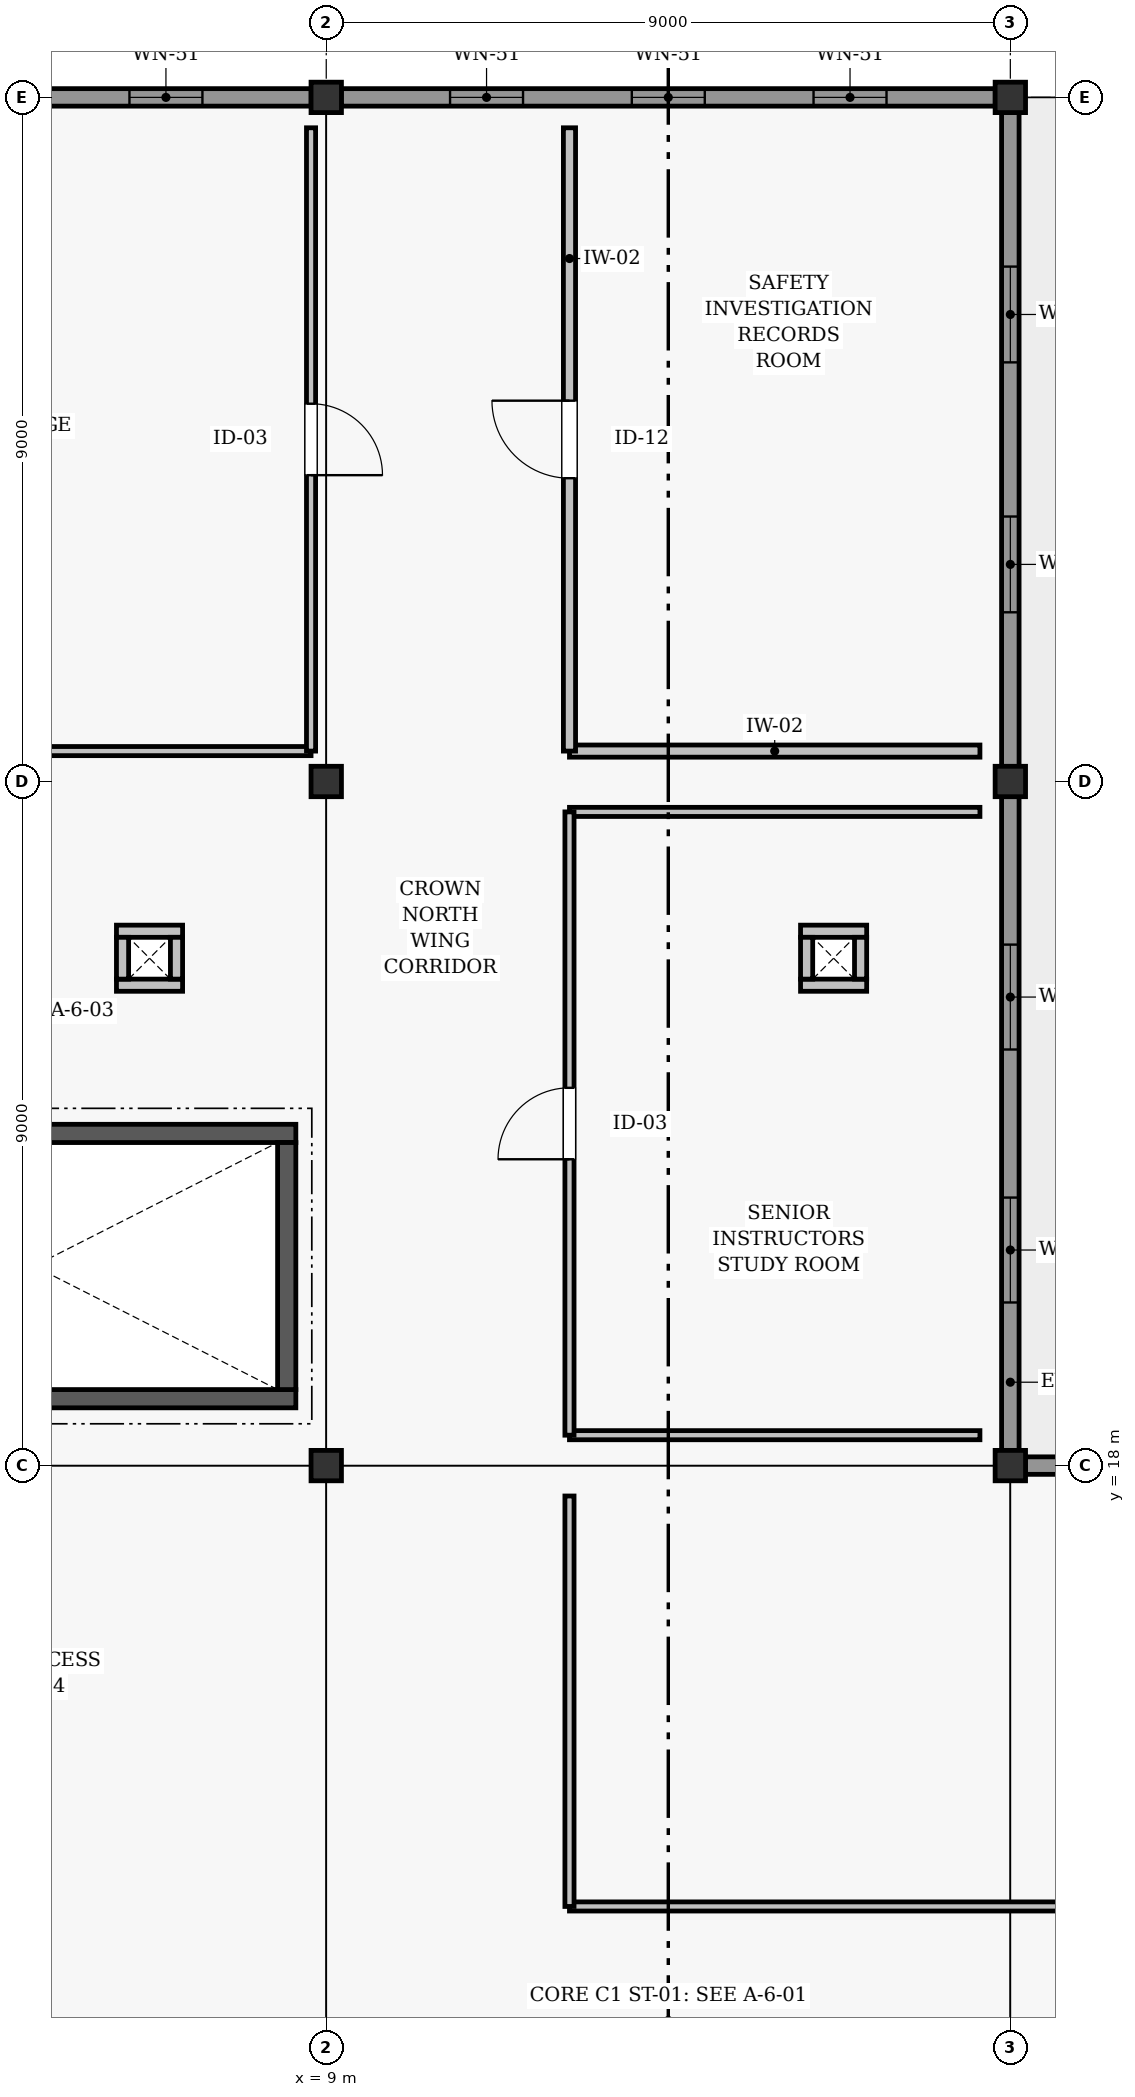
"""IFC4 building model, lengths in metres.
Left out: names, types, materials, properties, quantities, classifications, styles, units other than length and angle.
Written with IfcOpenShell. Run it as: python <this file> out.ifc"""

import sys

from ifc_helpers import new_model, si_unit, direction, frame, frame_2d, origin, origin_2d, place, context, subcontext, project, spatial, rectangle, extrude, element, fill, save


model = new_model("IFC4")
c1 = context("Model", 3, precision=1e-05, world=origin(), true_north=direction((0.0, 1.0)))
c2 = subcontext(c1, "Body", "Model", "MODEL_VIEW")
j1 = project(units=[si_unit("LENGTHUNIT", "METRE"), si_unit("PLANEANGLEUNIT", "RADIAN")], contexts=[c1])
p1 = place(None, origin())
s1 = spatial("IfcSite", under=j1, at=p1, CompositionType="ELEMENT")
p2 = place(p1, origin())
s2 = spatial("IfcBuilding", under=s1, at=p2, CompositionType="ELEMENT")
p3 = place(p2, frame((0.0, 0.0, 15.0)))
s3 = spatial("IfcBuildingStorey", under=s2, at=p3, CompositionType="ELEMENT", Elevation=15.0)
for number, where, z_axis, x_axis in (
    (1, (9.0, 18.0, 0.0), (0.0, 0.0, 1.0), (1.0, 0.0, 0.0)),
    (2, (9.0, 27.0, 0.0), (0.0, 0.0, 1.0), (1.0, 0.0, 0.0)),
    (3, (9.0, 36.0, 0.0), (0.0, 0.0, 1.0), (1.0, 0.0, 0.0)),
    (4, (18.0, 18.0, 0.0), (0.0, 0.0, 1.0), (1.0, 0.0, 0.0)),
    (5, (18.0, 27.0, 0.0), (0.0, 0.0, 1.0), (1.0, 0.0, 0.0)),
    (6, (18.0, 36.0, 0.0), (0.0, 0.0, 1.0), (1.0, 0.0, 0.0)),
):
    element("IfcColumn", number, at=place(p3, frame(where, z_axis=z_axis, x_axis=x_axis)), inside=s3, PredefinedType="COLUMN", context=c2, shape_type="SweptSolid", body=[
        extrude(rectangle(XDim=0.4, YDim=0.4, at=origin_2d()), origin(), (0.0, 0.0, 1.0), 3.0),
    ])
p4 = place(p3, frame((18.198, 18.0, 0.0), z_axis=(0.0, 0.0, 1.0), x_axis=(1.0, 0.0, 0.0)))
e7 = element("IfcWall", 7, at=p4, inside=s3, PredefinedType="SOLIDWALL", context=c2, shape_type="SweptSolid", body=[
    extrude(rectangle(XDim=8.604, YDim=0.23, at=frame_2d((4.302, 0.0))), origin(), (0.0, 0.0, 1.0), 2.242),
])
p5 = place(p4, frame((1.551, 0.0, 1.16)))
e8 = element("IfcOpeningElement", 8, at=p5, cuts=e7, PredefinedType="OPENING", context=c2, shape_type="SweptSolid", body=[
    extrude(rectangle(XDim=0.8, YDim=0.9, at=frame_2d((0.4, 0.45))), frame((0.0, 0.125, 0.0), z_axis=(0.0, -1.0, 0.0), x_axis=(1.0, 0.0, 0.0)), (0.0, 0.0, 1.0), 0.25),
])
p6 = place(p4, frame((3.902, 0.0, 1.16)))
e9 = element("IfcOpeningElement", 9, at=p6, cuts=e7, PredefinedType="OPENING", context=c2, shape_type="SweptSolid", body=[
    extrude(rectangle(XDim=0.8, YDim=0.9, at=frame_2d((0.4, 0.45))), frame((0.0, 0.125, 0.0), z_axis=(0.0, -1.0, 0.0), x_axis=(1.0, 0.0, 0.0)), (0.0, 0.0, 1.0), 0.25),
])
p7 = place(p4, frame((6.253, 0.0, 1.16)))
e10 = element("IfcOpeningElement", 10, at=p7, cuts=e7, PredefinedType="OPENING", context=c2, shape_type="SweptSolid", body=[
    extrude(rectangle(XDim=0.8, YDim=0.9, at=frame_2d((0.4, 0.45))), frame((0.0, 0.125, 0.0), z_axis=(0.0, -1.0, 0.0), x_axis=(1.0, 0.0, 0.0)), (0.0, 0.0, 1.0), 0.25),
])
p8 = place(p3, frame((0.198, 36.0, 0.0), z_axis=(0.0, 0.0, 1.0), x_axis=(1.0, 0.0, 0.0)))
e11 = element("IfcWall", 11, at=p8, inside=s3, PredefinedType="SOLIDWALL", context=c2, shape_type="SweptSolid", body=[
    extrude(rectangle(XDim=8.604, YDim=0.23, at=frame_2d((4.302, 0.0))), origin(), (0.0, 0.0, 1.0), 2.292),
])
p9 = place(p8, frame((1.431, 0.0, 0.8)))
e12 = element("IfcOpeningElement", 12, at=p9, cuts=e11, PredefinedType="OPENING", context=c2, shape_type="SweptSolid", body=[
    extrude(rectangle(XDim=0.96, YDim=1.04, at=frame_2d((0.48, 0.52))), frame((0.0, 0.125, 0.0), z_axis=(0.0, -1.0, 0.0), x_axis=(1.0, 0.0, 0.0)), (0.0, 0.0, 1.0), 0.25),
])
p10 = place(p8, frame((3.822, 0.0, 0.8)))
e13 = element("IfcOpeningElement", 13, at=p10, cuts=e11, PredefinedType="OPENING", context=c2, shape_type="SweptSolid", body=[
    extrude(rectangle(XDim=0.96, YDim=1.04, at=frame_2d((0.48, 0.52))), frame((0.0, 0.125, 0.0), z_axis=(0.0, -1.0, 0.0), x_axis=(1.0, 0.0, 0.0)), (0.0, 0.0, 1.0), 0.25),
])
p11 = place(p8, frame((6.213, 0.0, 0.8)))
e14 = element("IfcOpeningElement", 14, at=p11, cuts=e11, PredefinedType="OPENING", context=c2, shape_type="SweptSolid", body=[
    extrude(rectangle(XDim=0.96, YDim=1.04, at=frame_2d((0.48, 0.52))), frame((0.0, 0.125, 0.0), z_axis=(0.0, -1.0, 0.0), x_axis=(1.0, 0.0, 0.0)), (0.0, 0.0, 1.0), 0.25),
])
p12 = place(p3, frame((9.198, 36.0, 0.0), z_axis=(0.0, 0.0, 1.0), x_axis=(1.0, 0.0, 0.0)))
e15 = element("IfcWall", 15, at=p12, inside=s3, PredefinedType="SOLIDWALL", context=c2, shape_type="SweptSolid", body=[
    extrude(rectangle(XDim=8.604, YDim=0.23, at=frame_2d((4.302, 0.0))), origin(), (0.0, 0.0, 1.0), 2.292),
])
p13 = place(p12, frame((1.431, 0.0, 0.8)))
e16 = element("IfcOpeningElement", 16, at=p13, cuts=e15, PredefinedType="OPENING", context=c2, shape_type="SweptSolid", body=[
    extrude(rectangle(XDim=0.96, YDim=1.04, at=frame_2d((0.48, 0.52))), frame((0.0, 0.125, 0.0), z_axis=(0.0, -1.0, 0.0), x_axis=(1.0, 0.0, 0.0)), (0.0, 0.0, 1.0), 0.25),
])
p14 = place(p12, frame((3.822, 0.0, 0.8)))
e17 = element("IfcOpeningElement", 17, at=p14, cuts=e15, PredefinedType="OPENING", context=c2, shape_type="SweptSolid", body=[
    extrude(rectangle(XDim=0.96, YDim=1.04, at=frame_2d((0.48, 0.52))), frame((0.0, 0.125, 0.0), z_axis=(0.0, -1.0, 0.0), x_axis=(1.0, 0.0, 0.0)), (0.0, 0.0, 1.0), 0.25),
])
p15 = place(p12, frame((6.213, 0.0, 0.8)))
e18 = element("IfcOpeningElement", 18, at=p15, cuts=e15, PredefinedType="OPENING", context=c2, shape_type="SweptSolid", body=[
    extrude(rectangle(XDim=0.96, YDim=1.04, at=frame_2d((0.48, 0.52))), frame((0.0, 0.125, 0.0), z_axis=(0.0, -1.0, 0.0), x_axis=(1.0, 0.0, 0.0)), (0.0, 0.0, 1.0), 0.25),
])
p16 = place(p3, frame((18.0, 18.198, 0.0), z_axis=(0.0, 0.0, 1.0), x_axis=(0.0, 1.0, 0.0)))
e19 = element("IfcWall", 19, at=p16, inside=s3, PredefinedType="SOLIDWALL", context=c2, shape_type="SweptSolid", body=[
    extrude(rectangle(XDim=8.604, YDim=0.23, at=frame_2d((4.302, 0.0))), origin(), (0.0, 0.0, 1.0), 2.242),
])
p17 = place(p16, frame((1.948, 0.0, 0.54)))
e20 = element("IfcOpeningElement", 20, at=p17, cuts=e19, PredefinedType="OPENING", context=c2, shape_type="SweptSolid", body=[
    extrude(rectangle(XDim=1.38, YDim=1.52, at=frame_2d((0.69, 0.76))), frame((0.0, 0.125, 0.0), z_axis=(0.0, -1.0, 0.0), x_axis=(1.0, 0.0, 0.0)), (0.0, 0.0, 1.0), 0.25),
])
p18 = place(p16, frame((5.276, 0.0, 0.54)))
e21 = element("IfcOpeningElement", 21, at=p18, cuts=e19, PredefinedType="OPENING", context=c2, shape_type="SweptSolid", body=[
    extrude(rectangle(XDim=1.38, YDim=1.52, at=frame_2d((0.69, 0.76))), frame((0.0, 0.125, 0.0), z_axis=(0.0, -1.0, 0.0), x_axis=(1.0, 0.0, 0.0)), (0.0, 0.0, 1.0), 0.25),
])
p19 = place(p3, frame((18.0, 27.198, 0.0), z_axis=(0.0, 0.0, 1.0), x_axis=(0.0, 1.0, 0.0)))
e22 = element("IfcWall", 22, at=p19, inside=s3, PredefinedType="SOLIDWALL", context=c2, shape_type="SweptSolid", body=[
    extrude(rectangle(XDim=8.604, YDim=0.23, at=frame_2d((4.302, 0.0))), origin(), (0.0, 0.0, 1.0), 2.292),
])
p20 = place(p19, frame((2.028, 0.0, 0.65)))
e23 = element("IfcOpeningElement", 23, at=p20, cuts=e22, PredefinedType="OPENING", context=c2, shape_type="SweptSolid", body=[
    extrude(rectangle(XDim=1.26, YDim=1.46, at=frame_2d((0.63, 0.73))), frame((0.0, 0.125, 0.0), z_axis=(0.0, -1.0, 0.0), x_axis=(1.0, 0.0, 0.0)), (0.0, 0.0, 1.0), 0.25),
])
p21 = place(p19, frame((5.316, 0.0, 0.65)))
e24 = element("IfcOpeningElement", 24, at=p21, cuts=e22, PredefinedType="OPENING", context=c2, shape_type="SweptSolid", body=[
    extrude(rectangle(XDim=1.26, YDim=1.46, at=frame_2d((0.63, 0.73))), frame((0.0, 0.125, 0.0), z_axis=(0.0, -1.0, 0.0), x_axis=(1.0, 0.0, 0.0)), (0.0, 0.0, 1.0), 0.25),
])
p22 = place(p3, frame((0.16, 18.88, 0.0), z_axis=(0.0, 0.0, 1.0), x_axis=(1.0, 0.0, 0.0)))
e25 = element("IfcWall", 25, at=p22, inside=s3, PredefinedType="SHEAR", context=c2, shape_type="SweptSolid", body=[
    extrude(rectangle(XDim=8.44, YDim=0.24, at=frame_2d((4.22, 0.0))), origin(), (0.0, 0.0, 1.0), 2.79),
])
p23 = place(p22, frame((0.48, 0.0, 0.0)))
e26 = element("IfcOpeningElement", 26, at=p23, cuts=e25, PredefinedType="OPENING", context=c2, shape_type="SweptSolid", body=[
    extrude(rectangle(XDim=1.08, YDim=2.08, at=frame_2d((0.54, 1.04))), frame((0.0, 0.13, 0.0), z_axis=(0.0, -1.0, 0.0), x_axis=(1.0, 0.0, 0.0)), (0.0, 0.0, 1.0), 0.26),
])
p24 = place(p3, frame((0.16, 22.37, 0.0), z_axis=(0.0, 0.0, 1.0), x_axis=(1.0, 0.0, 0.0)))
e27 = element("IfcWall", 27, at=p24, inside=s3, PredefinedType="SHEAR", context=c2, shape_type="SweptSolid", body=[
    extrude(rectangle(XDim=8.44, YDim=0.24, at=frame_2d((4.22, 0.0))), origin(), (0.0, 0.0, 1.0), 2.79),
])
p25 = place(p3, frame((8.48, 19.0, 0.0), z_axis=(0.0, 0.0, 1.0), x_axis=(0.0, 1.0, 0.0)))
e28 = element("IfcWall", 28, at=p25, inside=s3, PredefinedType="SHEAR", context=c2, shape_type="SweptSolid", body=[
    extrude(rectangle(XDim=3.25, YDim=0.24, at=frame_2d((1.625, 0.0))), origin(), (0.0, 0.0, 1.0), 2.79),
])
for number, where, z_axis, x_axis in (
    (29, (6.24, 24.32, 0.0), (0.0, 0.0, 1.0), (1.0, 0.0, 0.0)),
    (30, (6.24, 25.03, 0.0), (0.0, 0.0, 1.0), (1.0, 0.0, 0.0)),
):
    element("IfcWall", number, at=place(p3, frame(where, z_axis=z_axis, x_axis=x_axis)), inside=s3, PredefinedType="PARTITIONING", context=c2, shape_type="SweptSolid", body=[
        extrude(rectangle(XDim=0.87, YDim=0.16, at=frame_2d((0.435, 0.0))), origin(), (0.0, 0.0, 1.0), 2.79),
    ])
for number, where, z_axis, x_axis in (
    (31, (6.32, 24.4, 0.0), (0.0, 0.0, 1.0), (0.0, 1.0, 0.0)),
    (32, (7.03, 24.4, 0.0), (0.0, 0.0, 1.0), (0.0, 1.0, 0.0)),
):
    element("IfcWall", number, at=place(p3, frame(where, z_axis=z_axis, x_axis=x_axis)), inside=s3, PredefinedType="PARTITIONING", context=c2, shape_type="SweptSolid", body=[
        extrude(rectangle(XDim=0.55, YDim=0.16, at=frame_2d((0.275, 0.0))), origin(), (0.0, 0.0, 1.0), 2.79),
    ])
for number, where, z_axis, x_axis in (
    (33, (15.24, 24.32, 0.0), (0.0, 0.0, 1.0), (1.0, 0.0, 0.0)),
    (34, (15.24, 25.03, 0.0), (0.0, 0.0, 1.0), (1.0, 0.0, 0.0)),
):
    element("IfcWall", number, at=place(p3, frame(where, z_axis=z_axis, x_axis=x_axis)), inside=s3, PredefinedType="PARTITIONING", context=c2, shape_type="SweptSolid", body=[
        extrude(rectangle(XDim=0.87, YDim=0.16, at=frame_2d((0.435, 0.0))), origin(), (0.0, 0.0, 1.0), 2.79),
    ])
for number, where, z_axis, x_axis in (
    (35, (15.32, 24.4, 0.0), (0.0, 0.0, 1.0), (0.0, 1.0, 0.0)),
    (36, (16.03, 24.4, 0.0), (0.0, 0.0, 1.0), (0.0, 1.0, 0.0)),
):
    element("IfcWall", number, at=place(p3, frame(where, z_axis=z_axis, x_axis=x_axis)), inside=s3, PredefinedType="PARTITIONING", context=c2, shape_type="SweptSolid", body=[
        extrude(rectangle(XDim=0.55, YDim=0.16, at=frame_2d((0.275, 0.0))), origin(), (0.0, 0.0, 1.0), 2.79),
    ])
p26 = place(p3, frame((12.2, 12.2, 0.0), z_axis=(0.0, 0.0, 1.0), x_axis=(1.0, 0.0, 0.0)))
e37 = element("IfcWall", 37, at=p26, inside=s3, PredefinedType="PARTITIONING", context=c2, shape_type="SweptSolid", body=[
    extrude(rectangle(XDim=23.4, YDim=0.12, at=frame_2d((11.7, 0.0))), origin(), (0.0, 0.0, 1.0), 2.245),
])
p27 = place(p26, frame((9.49, 0.0, 0.0)))
e38 = element("IfcOpeningElement", 38, at=p27, cuts=e37, PredefinedType="OPENING", context=c2, shape_type="SweptSolid", body=[
    extrude(rectangle(XDim=1.62, YDim=2.14, at=frame_2d((0.81, 1.07))), frame((0.0, 0.07, 0.0), z_axis=(0.0, -1.0, 0.0), x_axis=(1.0, 0.0, 0.0)), (0.0, 0.0, 1.0), 0.14),
])
for number, where, z_axis, x_axis in (
    (39, (12.2, 12.2, 0.0), (0.0, 0.0, 1.0), (0.0, 1.0, 0.0)),
    (40, (12.2, 18.4, 0.0), (0.0, 0.0, 1.0), (1.0, 0.0, 0.0)),
    (41, (12.2, 26.6, 0.0), (0.0, 0.0, 1.0), (1.0, 0.0, 0.0)),
):
    element("IfcWall", number, at=place(p3, frame(where, z_axis=z_axis, x_axis=x_axis)), inside=s3, PredefinedType="PARTITIONING", context=c2, shape_type="SweptSolid", body=[
        extrude(rectangle(XDim=5.4, YDim=0.12, at=frame_2d((2.7, 0.0))), origin(), (0.0, 0.0, 1.0), 2.79),
    ])
p28 = place(p3, frame((12.2, 18.4, 0.0), z_axis=(0.0, 0.0, 1.0), x_axis=(0.0, 1.0, 0.0)))
e42 = element("IfcWall", 42, at=p28, inside=s3, PredefinedType="PARTITIONING", context=c2, shape_type="SweptSolid", body=[
    extrude(rectangle(XDim=8.2, YDim=0.12, at=frame_2d((4.1, 0.0))), origin(), (0.0, 0.0, 1.0), 2.79),
])
p29 = place(p28, frame((3.63, 0.0, 0.0)))
e43 = element("IfcOpeningElement", 43, at=p29, cuts=e42, PredefinedType="OPENING", context=c2, shape_type="SweptSolid", body=[
    extrude(rectangle(XDim=0.94, YDim=2.06, at=frame_2d((0.47, 1.03))), frame((0.0, 0.07, 0.0), z_axis=(0.0, -1.0, 0.0), x_axis=(1.0, 0.0, 0.0)), (0.0, 0.0, 1.0), 0.14),
])
p30 = place(p3, frame((12.2, 27.4, 0.0), z_axis=(0.0, 0.0, 1.0), x_axis=(1.0, 0.0, 0.0)))
e44 = element("IfcWall", 44, at=p30, inside=s3, PredefinedType="PARTITIONING", context=c2, shape_type="SweptSolid", body=[
    extrude(rectangle(XDim=5.4, YDim=0.16, at=frame_2d((2.7, 0.0))), origin(), (0.0, 0.0, 1.0), 2.79),
])
p31 = place(p3, frame((12.2, 27.4, 0.0), z_axis=(0.0, 0.0, 1.0), x_axis=(0.0, 1.0, 0.0)))
e45 = element("IfcWall", 45, at=p31, inside=s3, PredefinedType="PARTITIONING", context=c2, shape_type="SweptSolid", body=[
    extrude(rectangle(XDim=8.2, YDim=0.16, at=frame_2d((4.1, 0.0))), origin(), (0.0, 0.0, 1.0), 2.79),
])
p32 = place(p31, frame((3.59, 0.0, 0.0)))
e46 = element("IfcOpeningElement", 46, at=p32, cuts=e45, PredefinedType="OPENING", context=c2, shape_type="SweptSolid", body=[
    extrude(rectangle(XDim=1.02, YDim=2.1, at=frame_2d((0.51, 1.05))), frame((0.0, 0.09, 0.0), z_axis=(0.0, -1.0, 0.0), x_axis=(1.0, 0.0, 0.0)), (0.0, 0.0, 1.0), 0.18),
])
p33 = place(p3, frame((0.4, 27.4, 0.0), z_axis=(0.0, 0.0, 1.0), x_axis=(1.0, 0.0, 0.0)))
e47 = element("IfcWall", 47, at=p33, inside=s3, PredefinedType="PARTITIONING", context=c2, shape_type="SweptSolid", body=[
    extrude(rectangle(XDim=8.4, YDim=0.12, at=frame_2d((4.2, 0.0))), origin(), (0.0, 0.0, 1.0), 2.295),
])
p34 = place(p3, frame((8.8, 27.4, 0.0), z_axis=(0.0, 0.0, 1.0), x_axis=(0.0, 1.0, 0.0)))
e48 = element("IfcWall", 48, at=p34, inside=s3, PredefinedType="PARTITIONING", context=c2, shape_type="SweptSolid", body=[
    extrude(rectangle(XDim=8.2, YDim=0.12, at=frame_2d((4.1, 0.0))), origin(), (0.0, 0.0, 1.0), 2.295),
])
p35 = place(p34, frame((3.63, 0.0, 0.0)))
e49 = element("IfcOpeningElement", 49, at=p35, cuts=e48, PredefinedType="OPENING", context=c2, shape_type="SweptSolid", body=[
    extrude(rectangle(XDim=0.94, YDim=2.06, at=frame_2d((0.47, 1.03))), frame((0.0, 0.07, 0.0), z_axis=(0.0, -1.0, 0.0), x_axis=(1.0, 0.0, 0.0)), (0.0, 0.0, 1.0), 0.14),
])
p36 = place(p11, origin())
e50 = element("IfcWindow", 50, at=p36, inside=s3, PartitioningType="SINGLE_PANEL", PredefinedType="WINDOW", context=c2, shape_type="SweptSolid", body=[
    extrude(rectangle(XDim=0.96, YDim=1.04, at=frame_2d((0.48, 0.52))), frame((0.0, 0.03, 0.0), z_axis=(0.0, -1.0, 0.0), x_axis=(1.0, 0.0, 0.0)), (0.0, 0.0, 1.0), 0.06),
])
fill(e14, e50)
p37 = place(p13, origin())
e51 = element("IfcWindow", 51, at=p37, inside=s3, PartitioningType="SINGLE_PANEL", PredefinedType="WINDOW", context=c2, shape_type="SweptSolid", body=[
    extrude(rectangle(XDim=0.96, YDim=1.04, at=frame_2d((0.48, 0.52))), frame((0.0, 0.03, 0.0), z_axis=(0.0, -1.0, 0.0), x_axis=(1.0, 0.0, 0.0)), (0.0, 0.0, 1.0), 0.06),
])
fill(e16, e51)
p38 = place(p14, origin())
e52 = element("IfcWindow", 52, at=p38, inside=s3, PartitioningType="SINGLE_PANEL", PredefinedType="WINDOW", context=c2, shape_type="SweptSolid", body=[
    extrude(rectangle(XDim=0.96, YDim=1.04, at=frame_2d((0.48, 0.52))), frame((0.0, 0.03, 0.0), z_axis=(0.0, -1.0, 0.0), x_axis=(1.0, 0.0, 0.0)), (0.0, 0.0, 1.0), 0.06),
])
fill(e17, e52)
p39 = place(p15, origin())
e53 = element("IfcWindow", 53, at=p39, inside=s3, PartitioningType="SINGLE_PANEL", PredefinedType="WINDOW", context=c2, shape_type="SweptSolid", body=[
    extrude(rectangle(XDim=0.96, YDim=1.04, at=frame_2d((0.48, 0.52))), frame((0.0, 0.03, 0.0), z_axis=(0.0, -1.0, 0.0), x_axis=(1.0, 0.0, 0.0)), (0.0, 0.0, 1.0), 0.06),
])
fill(e18, e53)
p40 = place(p17, origin())
e54 = element("IfcWindow", 54, at=p40, inside=s3, PartitioningType="SINGLE_PANEL", PredefinedType="WINDOW", context=c2, shape_type="SweptSolid", body=[
    extrude(rectangle(XDim=1.38, YDim=1.52, at=frame_2d((0.69, 0.76))), frame((0.0, 0.03, 0.0), z_axis=(0.0, -1.0, 0.0), x_axis=(1.0, 0.0, 0.0)), (0.0, 0.0, 1.0), 0.06),
])
fill(e20, e54)
p41 = place(p18, origin())
e55 = element("IfcWindow", 55, at=p41, inside=s3, PartitioningType="SINGLE_PANEL", PredefinedType="WINDOW", context=c2, shape_type="SweptSolid", body=[
    extrude(rectangle(XDim=1.38, YDim=1.52, at=frame_2d((0.69, 0.76))), frame((0.0, 0.03, 0.0), z_axis=(0.0, -1.0, 0.0), x_axis=(1.0, 0.0, 0.0)), (0.0, 0.0, 1.0), 0.06),
])
fill(e21, e55)
p42 = place(p20, origin())
e56 = element("IfcWindow", 56, at=p42, inside=s3, PartitioningType="SINGLE_PANEL", PredefinedType="WINDOW", context=c2, shape_type="SweptSolid", body=[
    extrude(rectangle(XDim=1.26, YDim=1.46, at=frame_2d((0.63, 0.73))), frame((0.0, 0.03, 0.0), z_axis=(0.0, -1.0, 0.0), x_axis=(1.0, 0.0, 0.0)), (0.0, 0.0, 1.0), 0.06),
])
fill(e23, e56)
p43 = place(p21, origin())
e57 = element("IfcWindow", 57, at=p43, inside=s3, PartitioningType="SINGLE_PANEL", PredefinedType="WINDOW", context=c2, shape_type="SweptSolid", body=[
    extrude(rectangle(XDim=1.26, YDim=1.46, at=frame_2d((0.63, 0.73))), frame((0.0, 0.03, 0.0), z_axis=(0.0, -1.0, 0.0), x_axis=(1.0, 0.0, 0.0)), (0.0, 0.0, 1.0), 0.06),
])
fill(e24, e57)
p44 = place(p29, origin())
e58 = element("IfcDoor", 58, at=p44, inside=s3, OperationType="SINGLE_SWING_LEFT", PredefinedType="DOOR", context=c2, shape_type="SweptSolid", body=[
    extrude(rectangle(XDim=0.94, YDim=2.06, at=frame_2d((0.47, 1.03))), frame((0.0, 0.025, 0.0), z_axis=(0.0, -1.0, 0.0), x_axis=(1.0, 0.0, 0.0)), (0.0, 0.0, 1.0), 0.05),
])
fill(e43, e58)
p45 = place(p32, origin())
e59 = element("IfcDoor", 59, at=p45, inside=s3, OperationType="SINGLE_SWING_RIGHT", PredefinedType="DOOR", context=c2, shape_type="SweptSolid", body=[
    extrude(rectangle(XDim=1.02, YDim=2.1, at=frame_2d((0.51, 1.05))), frame((0.0, 0.025, 0.0), z_axis=(0.0, -1.0, 0.0), x_axis=(1.0, 0.0, 0.0)), (0.0, 0.0, 1.0), 0.05),
])
fill(e46, e59)
p46 = place(p35, frame((0.94, 0.0, 0.0), z_axis=(0.0, 0.0, 1.0), x_axis=(-1.0, 0.0, 0.0)))
e60 = element("IfcDoor", 60, at=p46, inside=s3, OperationType="SINGLE_SWING_LEFT", PredefinedType="DOOR", context=c2, shape_type="SweptSolid", body=[
    extrude(rectangle(XDim=0.94, YDim=2.06, at=frame_2d((0.47, 1.03))), frame((0.0, 0.025, 0.0), z_axis=(0.0, -1.0, 0.0), x_axis=(1.0, 0.0, 0.0)), (0.0, 0.0, 1.0), 0.05),
])
fill(e49, e60)
save(model, sys.argv[1])
